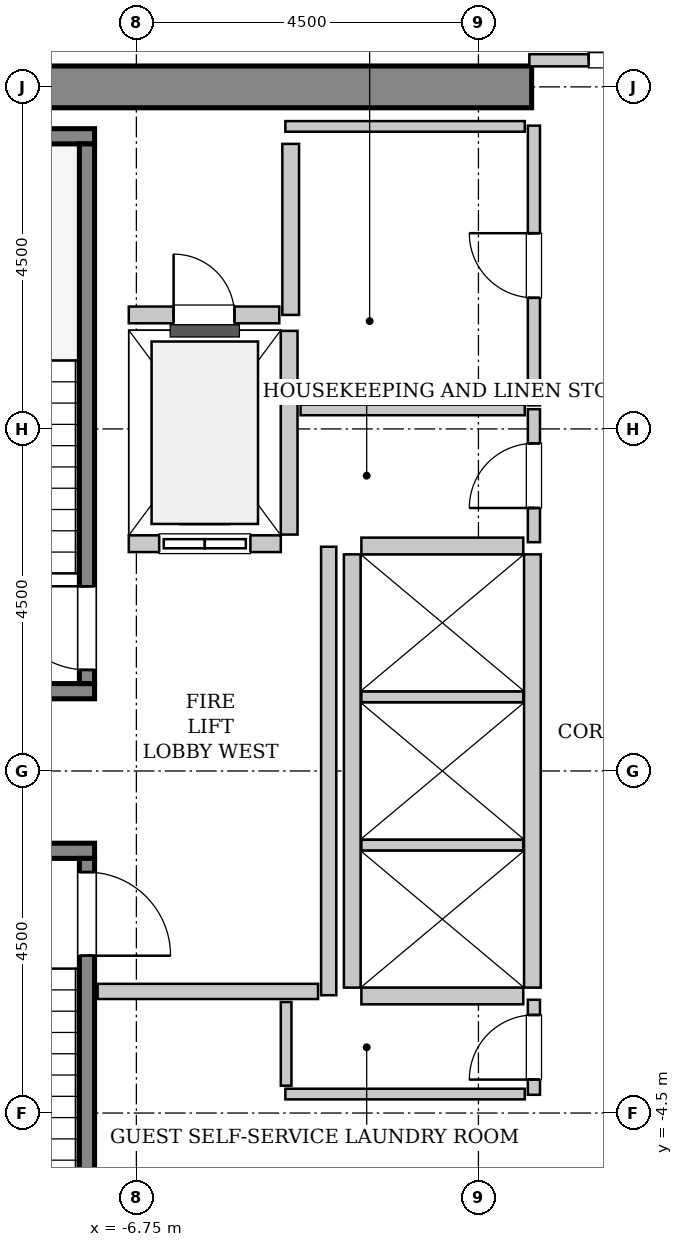
"""IFC4 building model, lengths in metres.
Left out: names, types, materials, properties, quantities, classifications, styles, units other than length and angle.
Written with IfcOpenShell. Run it as: python <this file> out.ifc"""

import sys

from ifc_helpers import new_model, si_unit, direction, frame, frame_2d, origin, place, context, subcontext, project, spatial, rectangle, extrude, source, transform, mapped, element, fill, save


model = new_model("IFC4")
c1 = context("Model", 3, precision=1e-05, world=origin(), true_north=direction((0.0, 1.0)))
c2 = subcontext(c1, "Body", "Model", "MODEL_VIEW")
j1 = project(units=[si_unit("LENGTHUNIT", "METRE"), si_unit("PLANEANGLEUNIT", "RADIAN")], contexts=[c1])
p1 = place(None, origin())
s1 = spatial("IfcSite", under=j1, at=p1, CompositionType="ELEMENT")
p2 = place(p1, origin())
s2 = spatial("IfcBuilding", under=s1, at=p2, CompositionType="ELEMENT")
p3 = place(p2, frame((0.0, 0.0, 156.4)))
s3 = spatial("IfcBuildingStorey", under=s2, at=p3, CompositionType="ELEMENT", Elevation=156.4)
m1 = source(origin(), c2, "Body", "SweptSolid", [
    extrude(rectangle(XDim=9.975, YDim=0.55, at=frame_2d((4.987, 0.0))), origin(), (0.0, 0.0, 1.0), 3.8),
])
p4 = place(p3, frame((-11.525, 9.0, 0.0), z_axis=(0.0, 0.0, 1.0), x_axis=(1.0, 0.0, 0.0)))
e1 = element("IfcWall", 1, at=p4, inside=s3, PredefinedType="SHEAR", context=c2, shape_type="MappedRepresentation", body=[
    mapped(m1, transform((0.0, 0.0, 0.0), x_axis=(1.0, 0.0, 0.0), y_axis=(0.0, 1.0, 0.0), z_axis=(0.0, 0.0, 1.0), scale=1.0)),
])
m2 = source(origin(), c2, "Body", "SweptSolid", [
    extrude(rectangle(XDim=3.4, YDim=0.2, at=frame_2d((1.7, 0.0))), origin(), (0.0, 0.0, 1.0), 3.8),
])
p5 = place(p3, frame((-7.3, 1.05, 0.0), z_axis=(0.0, 0.0, 1.0), x_axis=(-1.0, 0.0, 0.0)))
e2 = element("IfcWall", 2, at=p5, inside=s3, PredefinedType="SOLIDWALL", context=c2, shape_type="MappedRepresentation", body=[
    mapped(m2, transform((0.0, 0.0, 0.0), x_axis=(1.0, 0.0, 0.0), y_axis=(0.0, 1.0, 0.0), z_axis=(0.0, 0.0, 1.0), scale=1.0)),
])
m3 = source(origin(), c2, "Body", "SweptSolid", [
    extrude(rectangle(XDim=3.68, YDim=0.2, at=frame_2d((1.84, 0.0))), origin(), (0.0, 0.0, 1.0), 3.8),
])
p6 = place(p3, frame((-7.3, 8.35, 0.0), z_axis=(0.0, 0.0, 1.0), x_axis=(-1.0, 0.0, 0.0)))
e3 = element("IfcWall", 3, at=p6, inside=s3, PredefinedType="SOLIDWALL", context=c2, shape_type="MappedRepresentation", body=[
    mapped(m3, transform((0.0, 0.0, 0.0), x_axis=(1.0, 0.0, 0.0), y_axis=(0.0, 1.0, 0.0), z_axis=(0.0, 0.0, 1.0), scale=1.0)),
])
m4 = source(origin(), c2, "Body", "SweptSolid", [
    extrude(rectangle(XDim=7.1, YDim=0.2, at=frame_2d((3.55, 0.0))), origin(), (0.0, 0.0, 1.0), 3.8),
])
p7 = place(p3, frame((-7.4, 1.15, 0.0), z_axis=(0.0, 0.0, 1.0), x_axis=(0.0, 1.0, 0.0)))
e4 = element("IfcWall", 4, at=p7, inside=s3, PredefinedType="SOLIDWALL", context=c2, shape_type="MappedRepresentation", body=[
    mapped(m4, transform((0.0, 0.0, 0.0), x_axis=(1.0, 0.0, 0.0), y_axis=(0.0, 1.0, 0.0), z_axis=(0.0, 0.0, 1.0), scale=1.0)),
])
p8 = place(p7, frame((0.18, 0.0, 0.0)))
e5 = element("IfcOpeningElement", 5, at=p8, cuts=e4, PredefinedType="OPENING", context=c2, shape_type="SweptSolid", body=[
    extrude(rectangle(XDim=1.1, YDim=2.15, at=frame_2d((0.55, 1.075))), frame((0.0, 0.11, 0.0), z_axis=(0.0, -1.0, 0.0), x_axis=(1.0, 0.0, 0.0)), (0.0, 0.0, 1.0), 0.22),
])
p9 = place(p3, frame((-10.7, -1.05, 0.0), z_axis=(0.0, 0.0, 1.0), x_axis=(1.0, 0.0, 0.0)))
e6 = element("IfcWall", 6, at=p9, inside=s3, PredefinedType="SOLIDWALL", context=c2, shape_type="MappedRepresentation", body=[
    mapped(m2, transform((0.0, 0.0, 0.0), x_axis=(1.0, 0.0, 0.0), y_axis=(0.0, 1.0, 0.0), z_axis=(0.0, 0.0, 1.0), scale=1.0)),
])
p10 = place(p3, frame((-7.4, -1.15, 0.0), z_axis=(0.0, 0.0, 1.0), x_axis=(0.0, -1.0, 0.0)))
e7 = element("IfcWall", 7, at=p10, inside=s3, PredefinedType="SOLIDWALL", context=c2, shape_type="MappedRepresentation", body=[
    mapped(m4, transform((0.0, 0.0, 0.0), x_axis=(1.0, 0.0, 0.0), y_axis=(0.0, 1.0, 0.0), z_axis=(0.0, 0.0, 1.0), scale=1.0)),
])
p11 = place(p10, frame((0.18, 0.0, 0.0)))
e8 = element("IfcOpeningElement", 8, at=p11, cuts=e7, PredefinedType="OPENING", context=c2, shape_type="SweptSolid", body=[
    extrude(rectangle(XDim=1.1, YDim=2.15, at=frame_2d((0.55, 1.075))), frame((0.0, 0.11, 0.0), z_axis=(0.0, -1.0, 0.0), x_axis=(1.0, 0.0, 0.0)), (0.0, 0.0, 1.0), 0.22),
])
m5 = source(origin(), c2, "Body", "SweptSolid", [
    extrude(rectangle(XDim=2.0, YDim=0.22, at=frame_2d((1.0, 0.0))), origin(), (0.0, 0.0, 1.0), 3.535),
])
p12 = place(p3, frame((-6.85, 2.99, 0.0), z_axis=(0.0, 0.0, 1.0), x_axis=(1.0, 0.0, 0.0)))
e9 = element("IfcWall", 9, at=p12, inside=s3, PredefinedType="SOLIDWALL", context=c2, shape_type="MappedRepresentation", body=[
    mapped(m5, transform((0.0, 0.0, 0.0), x_axis=(1.0, 0.0, 0.0), y_axis=(0.0, 1.0, 0.0), z_axis=(0.0, 0.0, 1.0), scale=1.0)),
])
p13 = place(p12, frame((0.4, 0.0, 0.0)))
e10 = element("IfcOpeningElement", 10, at=p13, cuts=e9, PredefinedType="OPENING", context=c2, shape_type="SweptSolid", body=[
    extrude(rectangle(XDim=1.2, YDim=2.2, at=frame_2d((0.6, 1.1))), frame((0.0, 0.12, 0.0), z_axis=(0.0, -1.0, 0.0), x_axis=(1.0, 0.0, 0.0)), (0.0, 0.0, 1.0), 0.24),
])
m6 = source(origin(), c2, "Body", "SweptSolid", [
    extrude(rectangle(XDim=2.68, YDim=0.22, at=frame_2d((1.34, 0.0))), origin(), (0.0, 0.0, 1.0), 3.535),
])
p14 = place(p3, frame((-4.74, 3.11, 0.0), z_axis=(0.0, 0.0, 1.0), x_axis=(0.0, 1.0, 0.0)))
e11 = element("IfcWall", 11, at=p14, inside=s3, PredefinedType="SOLIDWALL", context=c2, shape_type="MappedRepresentation", body=[
    mapped(m6, transform((0.0, 0.0, 0.0), x_axis=(1.0, 0.0, 0.0), y_axis=(0.0, 1.0, 0.0), z_axis=(0.0, 0.0, 1.0), scale=1.0)),
])
m7 = source(origin(), c2, "Body", "SweptSolid", [
    extrude(rectangle(XDim=5.7, YDim=0.22, at=frame_2d((2.85, 0.0))), origin(), (0.0, 0.0, 1.0), 3.535),
])
for number, where, z_axis, x_axis in (
    (12, (-1.54, -2.85, 0.0), (0.0, 0.0, 1.0), (0.0, 1.0, 0.0)),
    (13, (-3.91, 2.85, 0.0), (0.0, 0.0, 1.0), (0.0, -1.0, 0.0)),
):
    element("IfcWall", number, at=place(p3, frame(where, z_axis=z_axis, x_axis=x_axis)), inside=s3, PredefinedType="SOLIDWALL", context=c2, shape_type="MappedRepresentation", body=[
        mapped(m7, transform((0.0, 0.0, 0.0), x_axis=(1.0, 0.0, 0.0), y_axis=(0.0, 1.0, 0.0), z_axis=(0.0, 0.0, 1.0), scale=1.0)),
    ])
m8 = source(origin(), c2, "Body", "SweptSolid", [
    extrude(rectangle(XDim=2.13, YDim=0.22, at=frame_2d((1.065, 0.0))), origin(), (0.0, 0.0, 1.0), 3.535),
])
p15 = place(p3, frame((-3.79, -2.96, 0.0), z_axis=(0.0, 0.0, 1.0), x_axis=(1.0, 0.0, 0.0)))
e14 = element("IfcWall", 14, at=p15, inside=s3, PredefinedType="SOLIDWALL", context=c2, shape_type="MappedRepresentation", body=[
    mapped(m8, transform((0.0, 0.0, 0.0), x_axis=(1.0, 0.0, 0.0), y_axis=(0.0, 1.0, 0.0), z_axis=(0.0, 0.0, 1.0), scale=1.0)),
])
m9 = source(origin(), c2, "Body", "SweptSolid", [
    extrude(rectangle(XDim=2.13, YDim=0.14, at=frame_2d((1.065, 0.0))), origin(), (0.0, 0.0, 1.0), 3.535),
])
for number, where, z_axis, x_axis in (
    (15, (-3.79, -0.975, 0.0), (0.0, 0.0, 1.0), (1.0, 0.0, 0.0)),
    (16, (-3.79, 0.975, 0.0), (0.0, 0.0, 1.0), (1.0, 0.0, 0.0)),
):
    element("IfcWall", number, at=place(p3, frame(where, z_axis=z_axis, x_axis=x_axis)), inside=s3, PredefinedType="PARTITIONING", context=c2, shape_type="MappedRepresentation", body=[
        mapped(m9, transform((0.0, 0.0, 0.0), x_axis=(1.0, 0.0, 0.0), y_axis=(0.0, 1.0, 0.0), z_axis=(0.0, 0.0, 1.0), scale=1.0)),
    ])
p16 = place(p3, frame((-1.66, 2.96, 0.0), z_axis=(0.0, 0.0, 1.0), x_axis=(-1.0, 0.0, 0.0)))
e17 = element("IfcWall", 17, at=p16, inside=s3, PredefinedType="SOLIDWALL", context=c2, shape_type="MappedRepresentation", body=[
    mapped(m8, transform((0.0, 0.0, 0.0), x_axis=(1.0, 0.0, 0.0), y_axis=(0.0, 1.0, 0.0), z_axis=(0.0, 0.0, 1.0), scale=1.0)),
])
m10 = source(origin(), c2, "Body", "SweptSolid", [
    extrude(rectangle(XDim=2.25, YDim=0.22, at=frame_2d((1.125, 0.0))), origin(), (0.0, 0.0, 1.0), 3.535),
])
p17 = place(p3, frame((-4.72, 6.0, 0.0), z_axis=(0.0, 0.0, 1.0), x_axis=(0.0, 1.0, 0.0)))
e18 = element("IfcWall", 18, at=p17, inside=s3, PredefinedType="SOLIDWALL", context=c2, shape_type="MappedRepresentation", body=[
    mapped(m10, transform((0.0, 0.0, 0.0), x_axis=(1.0, 0.0, 0.0), y_axis=(0.0, 1.0, 0.0), z_axis=(0.0, 0.0, 1.0), scale=1.0)),
])
m11 = source(origin(), c2, "Body", "SweptSolid", [
    extrude(rectangle(XDim=1.98, YDim=0.22, at=frame_2d((0.99, 0.0))), origin(), (0.0, 0.0, 1.0), 3.535),
])
p18 = place(p3, frame((-6.85, 6.0, 0.0), z_axis=(0.0, 0.0, 1.0), x_axis=(1.0, 0.0, 0.0)))
e19 = element("IfcWall", 19, at=p18, inside=s3, PredefinedType="SOLIDWALL", context=c2, shape_type="MappedRepresentation", body=[
    mapped(m11, transform((0.0, 0.0, 0.0), x_axis=(1.0, 0.0, 0.0), y_axis=(0.0, 1.0, 0.0), z_axis=(0.0, 0.0, 1.0), scale=1.0)),
])
p19 = place(p18, frame((0.59, 0.0, 0.0)))
e20 = element("IfcOpeningElement", 20, at=p19, cuts=e19, PredefinedType="OPENING", context=c2, shape_type="SweptSolid", body=[
    extrude(rectangle(XDim=0.8, YDim=2.0, at=frame_2d((0.4, 1.0))), frame((0.0, 0.12, 0.0), z_axis=(0.0, -1.0, 0.0), x_axis=(1.0, 0.0, 0.0)), (0.0, 0.0, 1.0), 0.24),
])
m12 = source(origin(), c2, "Body", "SweptSolid", [
    extrude(rectangle(XDim=5.9, YDim=0.2, at=frame_2d((2.95, 0.0))), origin(), (0.0, 0.0, 1.0), 3.535),
])
p20 = place(p3, frame((-4.22, -2.95, 0.0), z_axis=(0.0, 0.0, 1.0), x_axis=(0.0, 1.0, 0.0)))
e21 = element("IfcWall", 21, at=p20, inside=s3, PredefinedType="PARTITIONING", context=c2, shape_type="MappedRepresentation", body=[
    mapped(m12, transform((0.0, 0.0, 0.0), x_axis=(1.0, 0.0, 0.0), y_axis=(0.0, 1.0, 0.0), z_axis=(0.0, 0.0, 1.0), scale=1.0)),
])
m13 = source(origin(), c2, "Body", "SweptSolid", [
    extrude(rectangle(XDim=2.9, YDim=0.2, at=frame_2d((1.45, 0.0))), origin(), (0.0, 0.0, 1.0), 3.535),
])
p21 = place(p3, frame((-7.26, -2.9, 0.0), z_axis=(0.0, 0.0, 1.0), x_axis=(1.0, 0.0, 0.0)))
e22 = element("IfcWall", 22, at=p21, inside=s3, PredefinedType="PARTITIONING", context=c2, shape_type="MappedRepresentation", body=[
    mapped(m13, transform((0.0, 0.0, 0.0), x_axis=(1.0, 0.0, 0.0), y_axis=(0.0, 1.0, 0.0), z_axis=(0.0, 0.0, 1.0), scale=1.0)),
])
m14 = source(origin(), c2, "Body", "SweptSolid", [
    extrude(rectangle(XDim=3.16, YDim=0.16, at=frame_2d((1.58, 0.0))), origin(), (0.0, 0.0, 1.0), 2.425),
])
p22 = place(p3, frame((-1.58, 9.35, 0.0), z_axis=(0.0, 0.0, 1.0), x_axis=(1.0, 0.0, 0.0)))
e23 = element("IfcWall", 23, at=p22, inside=s3, PredefinedType="PARTITIONING", context=c2, shape_type="MappedRepresentation", body=[
    mapped(m14, transform((0.0, 0.0, 0.0), x_axis=(1.0, 0.0, 0.0), y_axis=(0.0, 1.0, 0.0), z_axis=(0.0, 0.0, 1.0), scale=1.0)),
])
p23 = place(p22, frame((0.78, 0.0, 0.0)))
e24 = element("IfcOpeningElement", 24, at=p23, cuts=e23, PredefinedType="OPENING", context=c2, shape_type="SweptSolid", body=[
    extrude(rectangle(XDim=1.6, YDim=2.3, at=frame_2d((0.8, 1.15))), frame((0.0, 0.09, 0.0), z_axis=(0.0, -1.0, 0.0), x_axis=(1.0, 0.0, 0.0)), (0.0, 0.0, 1.0), 0.18),
])
m15 = source(origin(), c2, "Body", "SweptSolid", [
    extrude(rectangle(XDim=1.75, YDim=0.16, at=frame_2d((0.875, 0.0))), origin(), (0.0, 0.0, 1.0), 3.535),
])
p24 = place(p3, frame((-1.52, 3.01, 0.0), z_axis=(0.0, 0.0, 1.0), x_axis=(0.0, 1.0, 0.0)))
e25 = element("IfcWall", 25, at=p24, inside=s3, PredefinedType="PARTITIONING", context=c2, shape_type="MappedRepresentation", body=[
    mapped(m15, transform((0.0, 0.0, 0.0), x_axis=(1.0, 0.0, 0.0), y_axis=(0.0, 1.0, 0.0), z_axis=(0.0, 0.0, 1.0), scale=1.0)),
])
p25 = place(p24, frame((0.45, 0.0, 0.0)))
e26 = element("IfcOpeningElement", 26, at=p25, cuts=e25, PredefinedType="OPENING", context=c2, shape_type="SweptSolid", body=[
    extrude(rectangle(XDim=0.85, YDim=2.1, at=frame_2d((0.425, 1.05))), frame((0.0, 0.09, 0.0), z_axis=(0.0, -1.0, 0.0), x_axis=(1.0, 0.0, 0.0)), (0.0, 0.0, 1.0), 0.18),
])
m16 = source(origin(), c2, "Body", "SweptSolid", [
    extrude(rectangle(XDim=2.95, YDim=0.14, at=frame_2d((1.475, 0.0))), origin(), (0.0, 0.0, 1.0), 3.535),
])
p26 = place(p3, frame((-4.59, 4.75, 0.0), z_axis=(0.0, 0.0, 1.0), x_axis=(1.0, 0.0, 0.0)))
e27 = element("IfcWall", 27, at=p26, inside=s3, PredefinedType="PARTITIONING", context=c2, shape_type="MappedRepresentation", body=[
    mapped(m16, transform((0.0, 0.0, 0.0), x_axis=(1.0, 0.0, 0.0), y_axis=(0.0, 1.0, 0.0), z_axis=(0.0, 0.0, 1.0), scale=1.0)),
])
m17 = source(origin(), c2, "Body", "SweptSolid", [
    extrude(rectangle(XDim=3.68, YDim=0.16, at=frame_2d((1.84, 0.0))), origin(), (0.0, 0.0, 1.0), 3.535),
])
p27 = place(p3, frame((-1.52, 4.81, 0.0), z_axis=(0.0, 0.0, 1.0), x_axis=(0.0, 1.0, 0.0)))
e28 = element("IfcWall", 28, at=p27, inside=s3, PredefinedType="PARTITIONING", context=c2, shape_type="MappedRepresentation", body=[
    mapped(m17, transform((0.0, 0.0, 0.0), x_axis=(1.0, 0.0, 0.0), y_axis=(0.0, 1.0, 0.0), z_axis=(0.0, 0.0, 1.0), scale=1.0)),
])
p28 = place(p27, frame((1.415, 0.0, 0.0)))
e29 = element("IfcOpeningElement", 29, at=p28, cuts=e28, PredefinedType="OPENING", context=c2, shape_type="SweptSolid", body=[
    extrude(rectangle(XDim=0.85, YDim=2.1, at=frame_2d((0.425, 1.05))), frame((0.0, 0.09, 0.0), z_axis=(0.0, -1.0, 0.0), x_axis=(1.0, 0.0, 0.0)), (0.0, 0.0, 1.0), 0.18),
])
m18 = source(origin(), c2, "Body", "SweptSolid", [
    extrude(rectangle(XDim=3.15, YDim=0.14, at=frame_2d((1.575, 0.0))), origin(), (0.0, 0.0, 1.0), 3.535),
])
p29 = place(p3, frame((-4.79, 8.48, 0.0), z_axis=(0.0, 0.0, 1.0), x_axis=(1.0, 0.0, 0.0)))
e30 = element("IfcWall", 30, at=p29, inside=s3, PredefinedType="PARTITIONING", context=c2, shape_type="MappedRepresentation", body=[
    mapped(m18, transform((0.0, 0.0, 0.0), x_axis=(1.0, 0.0, 0.0), y_axis=(0.0, 1.0, 0.0), z_axis=(0.0, 0.0, 1.0), scale=1.0)),
])
m19 = source(origin(), c2, "Body", "SweptSolid", [
    extrude(rectangle(XDim=1.25, YDim=0.16, at=frame_2d((0.625, 0.0))), origin(), (0.0, 0.0, 1.0), 3.535),
])
p30 = place(p3, frame((-1.52, -4.26, 0.0), z_axis=(0.0, 0.0, 1.0), x_axis=(0.0, 1.0, 0.0)))
e31 = element("IfcWall", 31, at=p30, inside=s3, PredefinedType="PARTITIONING", context=c2, shape_type="MappedRepresentation", body=[
    mapped(m19, transform((0.0, 0.0, 0.0), x_axis=(1.0, 0.0, 0.0), y_axis=(0.0, 1.0, 0.0), z_axis=(0.0, 0.0, 1.0), scale=1.0)),
])
p31 = place(p30, frame((0.2, 0.0, 0.0)))
e32 = element("IfcOpeningElement", 32, at=p31, cuts=e31, PredefinedType="OPENING", context=c2, shape_type="SweptSolid", body=[
    extrude(rectangle(XDim=0.85, YDim=2.1, at=frame_2d((0.425, 1.05))), frame((0.0, 0.09, 0.0), z_axis=(0.0, -1.0, 0.0), x_axis=(1.0, 0.0, 0.0)), (0.0, 0.0, 1.0), 0.18),
])
p32 = place(p3, frame((-4.79, -4.25, 0.0), z_axis=(0.0, 0.0, 1.0), x_axis=(1.0, 0.0, 0.0)))
e33 = element("IfcWall", 33, at=p32, inside=s3, PredefinedType="PARTITIONING", context=c2, shape_type="MappedRepresentation", body=[
    mapped(m18, transform((0.0, 0.0, 0.0), x_axis=(1.0, 0.0, 0.0), y_axis=(0.0, 1.0, 0.0), z_axis=(0.0, 0.0, 1.0), scale=1.0)),
])
m20 = source(origin(), c2, "Body", "SweptSolid", [
    extrude(rectangle(XDim=1.1, YDim=0.14, at=frame_2d((0.55, 0.0))), origin(), (0.0, 0.0, 1.0), 3.535),
])
p33 = place(p3, frame((-4.78, -4.14, 0.0), z_axis=(0.0, 0.0, 1.0), x_axis=(0.0, 1.0, 0.0)))
e34 = element("IfcWall", 34, at=p33, inside=s3, PredefinedType="PARTITIONING", context=c2, shape_type="MappedRepresentation", body=[
    mapped(m20, transform((0.0, 0.0, 0.0), x_axis=(1.0, 0.0, 0.0), y_axis=(0.0, 1.0, 0.0), z_axis=(0.0, 0.0, 1.0), scale=1.0)),
])
m21 = source(origin(), c2, "Body", "SweptSolid", [
    extrude(rectangle(XDim=1.1, YDim=2.15, at=frame_2d((0.55, 1.075))), frame((0.0, 0.025, 0.0), z_axis=(0.0, -1.0, 0.0), x_axis=(1.0, 0.0, 0.0)), (0.0, 0.0, 1.0), 0.05),
])
p34 = place(p8, origin())
e35 = element("IfcDoor", 35, at=p34, inside=s3, OperationType="SINGLE_SWING_RIGHT", PredefinedType="DOOR", context=c2, shape_type="MappedRepresentation", body=[
    mapped(m21, transform((0.0, 0.0, 0.0), x_axis=(1.0, 0.0, 0.0), y_axis=(0.0, 1.0, 0.0), z_axis=(0.0, 0.0, 1.0), scale=1.0)),
])
fill(e5, e35)
p35 = place(p11, origin())
e36 = element("IfcDoor", 36, at=p35, inside=s3, OperationType="SINGLE_SWING_RIGHT", PredefinedType="DOOR", context=c2, shape_type="MappedRepresentation", body=[
    mapped(m21, transform((0.0, 0.0, 0.0), x_axis=(1.0, 0.0, 0.0), y_axis=(0.0, 1.0, 0.0), z_axis=(0.0, 0.0, 1.0), scale=1.0)),
])
fill(e8, e36)
m22 = source(origin(), c2, "Body", "SweptSolid", [
    extrude(rectangle(XDim=1.2, YDim=2.2, at=frame_2d((0.6, 1.1))), frame((0.0, 0.025, 0.0), z_axis=(0.0, -1.0, 0.0), x_axis=(1.0, 0.0, 0.0)), (0.0, 0.0, 1.0), 0.05),
])
p36 = place(p13, origin())
e37 = element("IfcDoor", 37, at=p36, inside=s3, OperationType="SLIDING_TO_LEFT", PredefinedType="DOOR", context=c2, shape_type="MappedRepresentation", body=[
    mapped(m22, transform((0.0, 0.0, 0.0), x_axis=(1.0, 0.0, 0.0), y_axis=(0.0, 1.0, 0.0), z_axis=(0.0, 0.0, 1.0), scale=1.0)),
])
fill(e10, e37)
m23 = source(origin(), c2, "Body", "SweptSolid", [
    extrude(rectangle(XDim=0.8, YDim=2.0, at=frame_2d((0.4, 1.0))), frame((0.0, 0.025, 0.0), z_axis=(0.0, -1.0, 0.0), x_axis=(1.0, 0.0, 0.0)), (0.0, 0.0, 1.0), 0.05),
])
p37 = place(p19, origin())
e38 = element("IfcDoor", 38, at=p37, inside=s3, OperationType="SINGLE_SWING_LEFT", PredefinedType="TRAPDOOR", context=c2, shape_type="MappedRepresentation", body=[
    mapped(m23, transform((0.0, 0.0, 0.0), x_axis=(1.0, 0.0, 0.0), y_axis=(0.0, 1.0, 0.0), z_axis=(0.0, 0.0, 1.0), scale=1.0)),
])
fill(e20, e38)
m24 = source(origin(), c2, "Body", "SweptSolid", [
    extrude(rectangle(XDim=1.6, YDim=2.3, at=frame_2d((0.8, 1.15))), frame((0.0, 0.025, 0.0), z_axis=(0.0, -1.0, 0.0), x_axis=(1.0, 0.0, 0.0)), (0.0, 0.0, 1.0), 0.05),
])
p38 = place(p23, origin())
e39 = element("IfcDoor", 39, at=p38, inside=s3, OperationType="DOUBLE_DOOR_SINGLE_SWING", PredefinedType="DOOR", context=c2, shape_type="MappedRepresentation", body=[
    mapped(m24, transform((0.0, 0.0, 0.0), x_axis=(1.0, 0.0, 0.0), y_axis=(0.0, 1.0, 0.0), z_axis=(0.0, 0.0, 1.0), scale=1.0)),
])
fill(e24, e39)
m25 = source(origin(), c2, "Body", "SweptSolid", [
    extrude(rectangle(XDim=0.85, YDim=2.1, at=frame_2d((0.425, 1.05))), frame((0.0, 0.025, 0.0), z_axis=(0.0, -1.0, 0.0), x_axis=(1.0, 0.0, 0.0)), (0.0, 0.0, 1.0), 0.05),
])
p39 = place(p25, origin())
e40 = element("IfcDoor", 40, at=p39, inside=s3, OperationType="SINGLE_SWING_LEFT", PredefinedType="DOOR", context=c2, shape_type="MappedRepresentation", body=[
    mapped(m25, transform((0.0, 0.0, 0.0), x_axis=(1.0, 0.0, 0.0), y_axis=(0.0, 1.0, 0.0), z_axis=(0.0, 0.0, 1.0), scale=1.0)),
])
fill(e26, e40)
p40 = place(p28, origin())
e41 = element("IfcDoor", 41, at=p40, inside=s3, OperationType="SINGLE_SWING_RIGHT", PredefinedType="DOOR", context=c2, shape_type="MappedRepresentation", body=[
    mapped(m25, transform((0.0, 0.0, 0.0), x_axis=(1.0, 0.0, 0.0), y_axis=(0.0, 1.0, 0.0), z_axis=(0.0, 0.0, 1.0), scale=1.0)),
])
fill(e29, e41)
p41 = place(p31, origin())
e42 = element("IfcDoor", 42, at=p41, inside=s3, OperationType="SINGLE_SWING_LEFT", PredefinedType="DOOR", context=c2, shape_type="MappedRepresentation", body=[
    mapped(m25, transform((0.0, 0.0, 0.0), x_axis=(1.0, 0.0, 0.0), y_axis=(0.0, 1.0, 0.0), z_axis=(0.0, 0.0, 1.0), scale=1.0)),
])
fill(e32, e42)
save(model, sys.argv[1])
